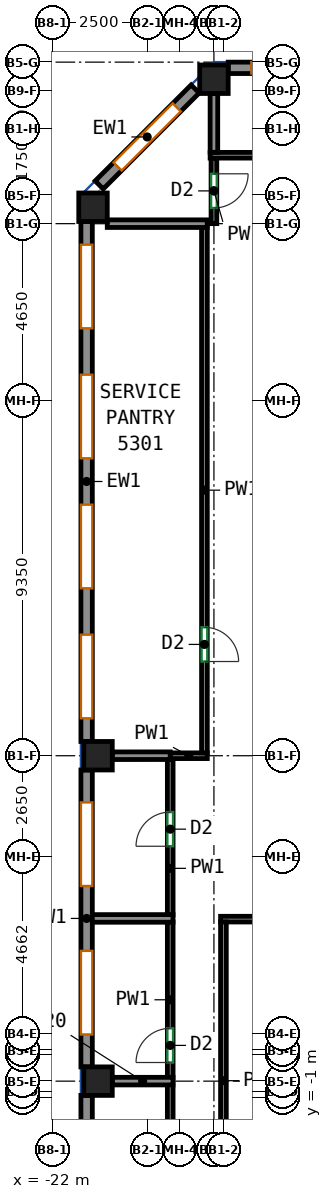
"""IFC4 building model, lengths in metres.
Left out: names, types, materials, properties, quantities, classifications, styles, units other than length and angle.
Written with IfcOpenShell. Run it as: python <this file> out.ifc"""

import sys

from ifc_helpers import new_model, si_unit, direction, frame, frame_2d, origin, origin_2d, place, context, subcontext, project, spatial, rectangle, extrude, source, transform, mapped, element, fill, save


model = new_model("IFC4")
c1 = context("Model", 3, precision=1e-05, world=origin(), true_north=direction((0.0, 1.0)))
c2 = subcontext(c1, "Body", "Model", "MODEL_VIEW")
j1 = project(units=[si_unit("LENGTHUNIT", "METRE"), si_unit("PLANEANGLEUNIT", "RADIAN")], contexts=[c1])
p1 = place(None, origin())
s1 = spatial("IfcSite", under=j1, at=p1, CompositionType="ELEMENT")
p2 = place(p1, origin())
s2 = spatial("IfcBuilding", under=s1, at=p2, CompositionType="ELEMENT")
p3 = place(p2, frame((0.0, 0.0, 216.9)))
s3 = spatial("IfcBuildingStorey", under=s2, at=p3, CompositionType="ELEMENT", Elevation=216.9)
m1 = source(origin(), c2, "Body", "SweptSolid", [
    extrude(rectangle(XDim=0.75, YDim=0.75, at=origin_2d()), origin(), (0.0, 0.0, 1.0), 3.12),
])
for number, where, z_axis, x_axis in (
    (1, (-20.932, 22.432, 0.0), (0.0, 0.0, 1.0), (1.0, 0.0, 0.0)),
    (2, (-20.8, -0.562, 0.0), (0.0, 0.0, 1.0), (1.0, 0.0, 0.0)),
    (3, (-20.8, 8.0, 0.0), (0.0, 0.0, 1.0), (1.0, 0.0, 0.0)),
    (4, (-17.75, 25.8, 0.0), (0.0, 0.0, 1.0), (1.0, 0.0, 0.0)),
):
    element("IfcColumn", number, at=place(p3, frame(where, z_axis=z_axis, x_axis=x_axis)), inside=s3, PredefinedType="COLUMN", context=c2, shape_type="MappedRepresentation", body=[
        mapped(m1, transform((0.0, 0.0, 0.0))),
    ])
m2 = source(origin(), c2, "Body", "SweptSolid", [
    extrude(rectangle(XDim=6.833, YDim=0.3, at=frame_2d((3.417, 0.0))), origin(), (0.0, 0.0, 1.0), 3.12),
])
p4 = place(p3, frame((-10.542, 26.1, 0.0), z_axis=(0.0, 0.0, 1.0), x_axis=(-1.0, 0.0, 0.0)))
e5 = element("IfcWall", 5, at=p4, inside=s3, PredefinedType="SOLIDWALL", context=c2, shape_type="MappedRepresentation", body=[
    mapped(m2, transform((0.0, 0.0, 0.0))),
])
p5 = place(p4, frame((0.608, 0.0, 0.85)))
e6 = element("IfcOpeningElement", 6, at=p5, cuts=e5, PredefinedType="OPENING", context=c2, shape_type="SweptSolid", body=[
    extrude(rectangle(XDim=2.2, YDim=1.95, at=frame_2d((1.1, 0.975))), frame((0.0, 0.16, 0.0), z_axis=(0.0, -1.0, 0.0), x_axis=(1.0, 0.0, 0.0)), (0.0, 0.0, 1.0), 0.32),
])
p6 = place(p4, frame((4.025, 0.0, 0.85)))
e7 = element("IfcOpeningElement", 7, at=p6, cuts=e5, PredefinedType="OPENING", context=c2, shape_type="SweptSolid", body=[
    extrude(rectangle(XDim=2.2, YDim=1.95, at=frame_2d((1.1, 0.975))), frame((0.0, 0.16, 0.0), z_axis=(0.0, -1.0, 0.0), x_axis=(1.0, 0.0, 0.0)), (0.0, 0.0, 1.0), 0.32),
])
m3 = source(origin(), c2, "Body", "SweptSolid", [
    extrude(rectangle(XDim=3.571, YDim=0.3, at=frame_2d((1.786, 0.0))), origin(), (0.0, 0.0, 1.0), 3.12),
])
p7 = place(p3, frame((-18.244, 25.544, 0.0), z_axis=(0.0, 0.0, 1.0), x_axis=(-0.707072595841, -0.707140964879, 0.0)))
e8 = element("IfcWall", 8, at=p7, inside=s3, PredefinedType="SOLIDWALL", context=c2, shape_type="MappedRepresentation", body=[
    mapped(m3, transform((0.0, 0.0, 0.0))),
])
p8 = place(p7, frame((0.686, 0.0, 0.85)))
e9 = element("IfcOpeningElement", 9, at=p8, cuts=e8, PredefinedType="OPENING", context=c2, shape_type="SweptSolid", body=[
    extrude(rectangle(XDim=2.2, YDim=1.95, at=frame_2d((1.1, 0.975))), frame((0.0, 0.16, 0.0), z_axis=(0.0, -1.0, 0.0), x_axis=(1.0, 0.0, 0.0)), (0.0, 0.0, 1.0), 0.32),
])
m4 = source(origin(), c2, "Body", "SweptSolid", [
    extrude(rectangle(XDim=13.682, YDim=0.3, at=frame_2d((6.841, 0.0))), origin(), (0.0, 0.0, 1.0), 3.12),
])
p9 = place(p3, frame((-21.1, 22.057, 0.0), z_axis=(0.0, 0.0, 1.0), x_axis=(0.0, -1.0, 0.0)))
e10 = element("IfcWall", 10, at=p9, inside=s3, PredefinedType="SOLIDWALL", context=c2, shape_type="MappedRepresentation", body=[
    mapped(m4, transform((0.0, 0.0, 0.0))),
])
p10 = place(p9, frame((0.61, 0.0, 0.85)))
e11 = element("IfcOpeningElement", 11, at=p10, cuts=e10, PredefinedType="OPENING", context=c2, shape_type="SweptSolid", body=[
    extrude(rectangle(XDim=2.2, YDim=1.95, at=frame_2d((1.1, 0.975))), frame((0.0, 0.16, 0.0), z_axis=(0.0, -1.0, 0.0), x_axis=(1.0, 0.0, 0.0)), (0.0, 0.0, 1.0), 0.32),
])
p11 = place(p9, frame((4.031, 0.0, 0.85)))
e12 = element("IfcOpeningElement", 12, at=p11, cuts=e10, PredefinedType="OPENING", context=c2, shape_type="SweptSolid", body=[
    extrude(rectangle(XDim=2.2, YDim=1.95, at=frame_2d((1.1, 0.975))), frame((0.0, 0.16, 0.0), z_axis=(0.0, -1.0, 0.0), x_axis=(1.0, 0.0, 0.0)), (0.0, 0.0, 1.0), 0.32),
])
p12 = place(p9, frame((7.451, 0.0, 0.85)))
e13 = element("IfcOpeningElement", 13, at=p12, cuts=e10, PredefinedType="OPENING", context=c2, shape_type="SweptSolid", body=[
    extrude(rectangle(XDim=2.2, YDim=1.95, at=frame_2d((1.1, 0.975))), frame((0.0, 0.16, 0.0), z_axis=(0.0, -1.0, 0.0), x_axis=(1.0, 0.0, 0.0)), (0.0, 0.0, 1.0), 0.32),
])
p13 = place(p9, frame((10.872, 0.0, 0.85)))
e14 = element("IfcOpeningElement", 14, at=p13, cuts=e10, PredefinedType="OPENING", context=c2, shape_type="SweptSolid", body=[
    extrude(rectangle(XDim=2.2, YDim=1.95, at=frame_2d((1.1, 0.975))), frame((0.0, 0.16, 0.0), z_axis=(0.0, -1.0, 0.0), x_axis=(1.0, 0.0, 0.0)), (0.0, 0.0, 1.0), 0.32),
])
m5 = source(origin(), c2, "Body", "SweptSolid", [
    extrude(rectangle(XDim=7.812, YDim=0.3, at=frame_2d((3.906, 0.0))), origin(), (0.0, 0.0, 1.0), 3.12),
])
p14 = place(p3, frame((-21.1, 7.625, 0.0), z_axis=(0.0, 0.0, 1.0), x_axis=(0.0, -1.0, 0.0)))
e15 = element("IfcWall", 15, at=p14, inside=s3, PredefinedType="SOLIDWALL", context=c2, shape_type="MappedRepresentation", body=[
    mapped(m5, transform((0.0, 0.0, 0.0))),
])
p15 = place(p14, frame((0.853, 0.0, 0.85)))
e16 = element("IfcOpeningElement", 16, at=p15, cuts=e15, PredefinedType="OPENING", context=c2, shape_type="SweptSolid", body=[
    extrude(rectangle(XDim=2.2, YDim=1.95, at=frame_2d((1.1, 0.975))), frame((0.0, 0.16, 0.0), z_axis=(0.0, -1.0, 0.0), x_axis=(1.0, 0.0, 0.0)), (0.0, 0.0, 1.0), 0.32),
])
p16 = place(p14, frame((4.759, 0.0, 0.85)))
e17 = element("IfcOpeningElement", 17, at=p16, cuts=e15, PredefinedType="OPENING", context=c2, shape_type="SweptSolid", body=[
    extrude(rectangle(XDim=2.2, YDim=1.95, at=frame_2d((1.1, 0.975))), frame((0.0, 0.16, 0.0), z_axis=(0.0, -1.0, 0.0), x_axis=(1.0, 0.0, 0.0)), (0.0, 0.0, 1.0), 0.32),
])
p17 = place(p3, frame((-21.1, -0.938, 0.0), z_axis=(0.0, 0.0, 1.0), x_axis=(0.0, -1.0, 0.0)))
e18 = element("IfcWall", 18, at=p17, inside=s3, PredefinedType="SOLIDWALL", context=c2, shape_type="MappedRepresentation", body=[
    mapped(m5, transform((0.0, 0.0, 0.0))),
])
p18 = place(p17, frame((0.853, 0.0, 0.85)))
e19 = element("IfcOpeningElement", 19, at=p18, cuts=e18, PredefinedType="OPENING", context=c2, shape_type="SweptSolid", body=[
    extrude(rectangle(XDim=2.2, YDim=1.95, at=frame_2d((1.1, 0.975))), frame((0.0, 0.16, 0.0), z_axis=(0.0, -1.0, 0.0), x_axis=(1.0, 0.0, 0.0)), (0.0, 0.0, 1.0), 0.32),
])
p19 = place(p17, frame((4.76, 0.0, 0.85)))
e20 = element("IfcOpeningElement", 20, at=p19, cuts=e18, PredefinedType="OPENING", context=c2, shape_type="SweptSolid", body=[
    extrude(rectangle(XDim=2.2, YDim=1.95, at=frame_2d((1.1, 0.975))), frame((0.0, 0.16, 0.0), z_axis=(0.0, -1.0, 0.0), x_axis=(1.0, 0.0, 0.0)), (0.0, 0.0, 1.0), 0.32),
])
p20 = place(p3, frame((-17.925, 8.0, 0.0), z_axis=(0.0, 0.0, 1.0), x_axis=(-1.0, 0.0, 0.0)))
e21 = element("IfcWall", 21, at=p20, inside=s3, PredefinedType="PARTITIONING", context=c2, shape_type="SweptSolid", body=[
    extrude(rectangle(XDim=0.976, YDim=0.15, at=frame_2d((0.488, 0.0))), origin(), (0.0, 0.0, 1.0), 3.12),
])
p21 = place(p3, frame((-18.0, 21.9, 0.0), z_axis=(0.0, 0.0, 1.0), x_axis=(0.0, -1.0, 0.0)))
e22 = element("IfcWall", 22, at=p21, inside=s3, PredefinedType="PARTITIONING", context=c2, shape_type="SweptSolid", body=[
    extrude(rectangle(XDim=13.825, YDim=0.15, at=frame_2d((6.913, 0.0))), origin(), (0.0, 0.0, 1.0), 3.12),
])
p22 = place(p21, frame((10.521, 0.0, 0.0)))
e23 = element("IfcOpeningElement", 23, at=p22, cuts=e22, PredefinedType="OPENING", context=c2, shape_type="SweptSolid", body=[
    extrude(rectangle(XDim=0.9, YDim=2.1, at=frame_2d((0.45, 1.05))), frame((0.0, 0.085, 0.0), z_axis=(0.0, -1.0, 0.0), x_axis=(1.0, 0.0, 0.0)), (0.0, 0.0, 1.0), 0.17),
])
p23 = place(p3, frame((-18.9, -4.753, 0.0), z_axis=(0.0, 0.0, 1.0), x_axis=(0.0, 1.0, 0.0)))
e24 = element("IfcWall", 24, at=p23, inside=s3, PredefinedType="PARTITIONING", context=c2, shape_type="SweptSolid", body=[
    extrude(rectangle(XDim=4.101, YDim=0.15, at=frame_2d((2.05, 0.0))), origin(), (0.0, 0.0, 1.0), 3.12),
])
p24 = place(p23, frame((0.5, 0.0, 0.0)))
e25 = element("IfcOpeningElement", 25, at=p24, cuts=e24, PredefinedType="OPENING", context=c2, shape_type="SweptSolid", body=[
    extrude(rectangle(XDim=0.9, YDim=2.1, at=frame_2d((0.45, 1.05))), frame((0.0, 0.085, 0.0), z_axis=(0.0, -1.0, 0.0), x_axis=(1.0, 0.0, 0.0)), (0.0, 0.0, 1.0), 0.17),
])
p25 = place(p3, frame((-18.9, -0.472, 0.0), z_axis=(0.0, 0.0, 1.0), x_axis=(0.0, 1.0, 0.0)))
e26 = element("IfcWall", 26, at=p25, inside=s3, PredefinedType="PARTITIONING", context=c2, shape_type="SweptSolid", body=[
    extrude(rectangle(XDim=4.101, YDim=0.15, at=frame_2d((2.05, 0.0))), origin(), (0.0, 0.0, 1.0), 3.12),
])
p26 = place(p25, frame((0.4, 0.0, 0.0)))
e27 = element("IfcOpeningElement", 27, at=p26, cuts=e26, PredefinedType="OPENING", context=c2, shape_type="SweptSolid", body=[
    extrude(rectangle(XDim=0.9, YDim=2.1, at=frame_2d((0.45, 1.05))), frame((0.0, 0.085, 0.0), z_axis=(0.0, -1.0, 0.0), x_axis=(1.0, 0.0, 0.0)), (0.0, 0.0, 1.0), 0.17),
])
p27 = place(p3, frame((-18.9, 3.809, 0.0), z_axis=(0.0, 0.0, 1.0), x_axis=(0.0, 1.0, 0.0)))
e28 = element("IfcWall", 28, at=p27, inside=s3, PredefinedType="PARTITIONING", context=c2, shape_type="SweptSolid", body=[
    extrude(rectangle(XDim=4.092, YDim=0.15, at=frame_2d((2.046, 0.0))), origin(), (0.0, 0.0, 1.0), 3.12),
])
p28 = place(p27, frame((1.809, 0.0, 0.0)))
e29 = element("IfcOpeningElement", 29, at=p28, cuts=e28, PredefinedType="OPENING", context=c2, shape_type="SweptSolid", body=[
    extrude(rectangle(XDim=0.9, YDim=2.1, at=frame_2d((0.45, 1.05))), frame((0.0, 0.085, 0.0), z_axis=(0.0, -1.0, 0.0), x_axis=(1.0, 0.0, 0.0)), (0.0, 0.0, 1.0), 0.17),
])
p29 = place(p3, frame((-17.75, 23.725, 0.0), z_axis=(0.0, 0.0, 1.0), x_axis=(0.0, -1.0, 0.0)))
e30 = element("IfcWall", 30, at=p29, inside=s3, PredefinedType="PARTITIONING", context=c2, shape_type="SweptSolid", body=[
    extrude(rectangle(XDim=1.725, YDim=0.15, at=frame_2d((0.863, 0.0))), origin(), (0.0, 0.0, 1.0), 3.12),
])
p30 = place(p29, frame((0.413, 0.0, 0.0)))
e31 = element("IfcOpeningElement", 31, at=p30, cuts=e30, PredefinedType="OPENING", context=c2, shape_type="SweptSolid", body=[
    extrude(rectangle(XDim=0.9, YDim=2.1, at=frame_2d((0.45, 1.05))), frame((0.0, 0.085, 0.0), z_axis=(0.0, -1.0, 0.0), x_axis=(1.0, 0.0, 0.0)), (0.0, 0.0, 1.0), 0.17),
])
p31 = place(p3, frame((27.85, 23.8, 0.0), z_axis=(0.0, 0.0, 1.0), x_axis=(-1.0, 0.0, 0.0)))
e32 = element("IfcWall", 32, at=p31, inside=s3, PredefinedType="PARTITIONING", context=c2, shape_type="SweptSolid", body=[
    extrude(rectangle(XDim=45.7, YDim=0.15, at=frame_2d((22.85, 0.0))), origin(), (0.0, 0.0, 1.0), 3.12),
])
p32 = place(p31, frame((16.838, 0.0, 0.0)))
e33 = element("IfcOpeningElement", 33, at=p32, cuts=e32, PredefinedType="OPENING", context=c2, shape_type="SweptSolid", body=[
    extrude(rectangle(XDim=1.0, YDim=2.1, at=frame_2d((0.5, 1.05))), frame((0.0, 0.085, 0.0), z_axis=(0.0, -1.0, 0.0), x_axis=(1.0, 0.0, 0.0)), (0.0, 0.0, 1.0), 0.17),
])
p33 = place(p3, frame((-17.575, 3.7, 0.0), z_axis=(0.0, 0.0, 1.0), x_axis=(1.0, 0.0, 0.0)))
e34 = element("IfcWall", 34, at=p33, inside=s3, PredefinedType="PARTITIONING", context=c2, shape_type="SweptSolid", body=[
    extrude(rectangle(XDim=33.85, YDim=0.15, at=frame_2d((16.925, 0.0))), origin(), (0.0, 0.0, 1.0), 3.12),
])
p34 = place(p33, frame((1.902, 0.0, 0.0)))
e35 = element("IfcOpeningElement", 35, at=p34, cuts=e34, PredefinedType="OPENING", context=c2, shape_type="SweptSolid", body=[
    extrude(rectangle(XDim=0.9, YDim=2.1, at=frame_2d((0.45, 1.05))), frame((0.0, 0.085, 0.0), z_axis=(0.0, -1.0, 0.0), x_axis=(1.0, 0.0, 0.0)), (0.0, 0.0, 1.0), 0.17),
])
p35 = place(p33, frame((15.841, 0.0, 0.0)))
e36 = element("IfcOpeningElement", 36, at=p35, cuts=e34, PredefinedType="OPENING", context=c2, shape_type="SweptSolid", body=[
    extrude(rectangle(XDim=0.9, YDim=2.1, at=frame_2d((0.45, 1.05))), frame((0.0, 0.085, 0.0), z_axis=(0.0, -1.0, 0.0), x_axis=(1.0, 0.0, 0.0)), (0.0, 0.0, 1.0), 0.17),
])
p36 = place(p33, frame((20.724, 0.0, 0.0)))
e37 = element("IfcOpeningElement", 37, at=p36, cuts=e34, PredefinedType="OPENING", context=c2, shape_type="SweptSolid", body=[
    extrude(rectangle(XDim=0.9, YDim=2.1, at=frame_2d((0.45, 1.05))), frame((0.0, 0.085, 0.0), z_axis=(0.0, -1.0, 0.0), x_axis=(1.0, 0.0, 0.0)), (0.0, 0.0, 1.0), 0.17),
])
p37 = place(p33, frame((27.46, 0.0, 0.0)))
e38 = element("IfcOpeningElement", 38, at=p37, cuts=e34, PredefinedType="OPENING", context=c2, shape_type="SweptSolid", body=[
    extrude(rectangle(XDim=0.9, YDim=2.1, at=frame_2d((0.45, 1.05))), frame((0.0, 0.085, 0.0), z_axis=(0.0, -1.0, 0.0), x_axis=(1.0, 0.0, 0.0)), (0.0, 0.0, 1.0), 0.17),
])
p38 = place(p3, frame((-17.5, -4.725, 0.0), z_axis=(0.0, 0.0, 1.0), x_axis=(0.0, 1.0, 0.0)))
e39 = element("IfcWall", 39, at=p38, inside=s3, PredefinedType="PARTITIONING", context=c2, shape_type="SweptSolid", body=[
    extrude(rectangle(XDim=8.35, YDim=0.15, at=frame_2d((4.175, 0.0))), origin(), (0.0, 0.0, 1.0), 3.12),
])
p39 = place(p3, frame((-20.425, 8.0, 0.0), z_axis=(0.0, 0.0, 1.0), x_axis=(0.999999794741, 0.000640717472, 0.0)))
e40 = element("IfcWall", 40, at=p39, inside=s3, PredefinedType="PARTITIONING", context=c2, shape_type="SweptSolid", body=[
    extrude(rectangle(XDim=1.524, YDim=0.2, at=frame_2d((0.762, 0.0))), origin(), (0.0, 0.0, 1.0), 3.12),
])
p40 = place(p3, frame((-17.927, 22.0, 0.0), z_axis=(0.0, 0.0, 1.0), x_axis=(-1.0, 0.0, 0.0)))
e41 = element("IfcWall", 41, at=p40, inside=s3, PredefinedType="PARTITIONING", context=c2, shape_type="SweptSolid", body=[
    extrude(rectangle(XDim=2.63, YDim=0.2, at=frame_2d((1.315, 0.0))), origin(), (0.0, 0.0, 1.0), 3.12),
])
p41 = place(p3, frame((-18.827, -0.562, 0.0), z_axis=(0.0, 0.0, 1.0), x_axis=(-1.0, 0.0, 0.0)))
e42 = element("IfcWall", 42, at=p41, inside=s3, PredefinedType="PARTITIONING", context=c2, shape_type="SweptSolid", body=[
    extrude(rectangle(XDim=1.598, YDim=0.2, at=frame_2d((0.799, 0.0))), origin(), (0.0, 0.0, 1.0), 2.52),
])
p42 = place(p3, frame((-21.0, 3.719, 0.0), z_axis=(0.0, 0.0, 1.0), x_axis=(1.0, 0.0, 0.0)))
e43 = element("IfcWall", 43, at=p42, inside=s3, PredefinedType="PARTITIONING", context=c2, shape_type="SweptSolid", body=[
    extrude(rectangle(XDim=2.173, YDim=0.2, at=frame_2d((1.086, 0.0))), origin(), (0.0, 0.0, 1.0), 3.12),
])
p43 = place(p3, frame((-17.75, 23.877, 0.0), z_axis=(0.0, 0.0, 1.0), x_axis=(0.0, 1.0, 0.0)))
e44 = element("IfcWall", 44, at=p43, inside=s3, PredefinedType="PARTITIONING", context=c2, shape_type="SweptSolid", body=[
    extrude(rectangle(XDim=1.548, YDim=0.2, at=frame_2d((0.774, 0.0))), origin(), (0.0, 0.0, 1.0), 3.12),
])
p44 = place(p6, origin())
e45 = element("IfcWindow", 45, at=p44, inside=s3, PartitioningType="SINGLE_PANEL", PredefinedType="WINDOW", context=c2, shape_type="SweptSolid", body=[
    extrude(rectangle(XDim=2.2, YDim=1.95, at=frame_2d((1.1, 0.975))), frame((0.0, 0.03, 0.0), z_axis=(0.0, -1.0, 0.0), x_axis=(1.0, 0.0, 0.0)), (0.0, 0.0, 1.0), 0.06),
])
fill(e7, e45)
p45 = place(p8, origin())
e46 = element("IfcWindow", 46, at=p45, inside=s3, PartitioningType="SINGLE_PANEL", PredefinedType="WINDOW", context=c2, shape_type="SweptSolid", body=[
    extrude(rectangle(XDim=2.2, YDim=1.95, at=frame_2d((1.1, 0.975))), frame((0.0, 0.03, 0.0), z_axis=(0.0, -1.0, 0.0), x_axis=(1.0, 0.0, 0.0)), (0.0, 0.0, 1.0), 0.06),
])
fill(e9, e46)
p46 = place(p10, origin())
e47 = element("IfcWindow", 47, at=p46, inside=s3, PartitioningType="SINGLE_PANEL", PredefinedType="WINDOW", context=c2, shape_type="SweptSolid", body=[
    extrude(rectangle(XDim=2.2, YDim=1.95, at=frame_2d((1.1, 0.975))), frame((0.0, 0.03, 0.0), z_axis=(0.0, -1.0, 0.0), x_axis=(1.0, 0.0, 0.0)), (0.0, 0.0, 1.0), 0.06),
])
fill(e11, e47)
p47 = place(p11, origin())
e48 = element("IfcWindow", 48, at=p47, inside=s3, PartitioningType="SINGLE_PANEL", PredefinedType="WINDOW", context=c2, shape_type="SweptSolid", body=[
    extrude(rectangle(XDim=2.2, YDim=1.95, at=frame_2d((1.1, 0.975))), frame((0.0, 0.03, 0.0), z_axis=(0.0, -1.0, 0.0), x_axis=(1.0, 0.0, 0.0)), (0.0, 0.0, 1.0), 0.06),
])
fill(e12, e48)
p48 = place(p12, origin())
e49 = element("IfcWindow", 49, at=p48, inside=s3, PartitioningType="SINGLE_PANEL", PredefinedType="WINDOW", context=c2, shape_type="SweptSolid", body=[
    extrude(rectangle(XDim=2.2, YDim=1.95, at=frame_2d((1.1, 0.975))), frame((0.0, 0.03, 0.0), z_axis=(0.0, -1.0, 0.0), x_axis=(1.0, 0.0, 0.0)), (0.0, 0.0, 1.0), 0.06),
])
fill(e13, e49)
p49 = place(p13, origin())
e50 = element("IfcWindow", 50, at=p49, inside=s3, PartitioningType="SINGLE_PANEL", PredefinedType="WINDOW", context=c2, shape_type="SweptSolid", body=[
    extrude(rectangle(XDim=2.2, YDim=1.95, at=frame_2d((1.1, 0.975))), frame((0.0, 0.03, 0.0), z_axis=(0.0, -1.0, 0.0), x_axis=(1.0, 0.0, 0.0)), (0.0, 0.0, 1.0), 0.06),
])
fill(e14, e50)
p50 = place(p15, origin())
e51 = element("IfcWindow", 51, at=p50, inside=s3, PartitioningType="SINGLE_PANEL", PredefinedType="WINDOW", context=c2, shape_type="SweptSolid", body=[
    extrude(rectangle(XDim=2.2, YDim=1.95, at=frame_2d((1.1, 0.975))), frame((0.0, 0.03, 0.0), z_axis=(0.0, -1.0, 0.0), x_axis=(1.0, 0.0, 0.0)), (0.0, 0.0, 1.0), 0.06),
])
fill(e16, e51)
p51 = place(p16, origin())
e52 = element("IfcWindow", 52, at=p51, inside=s3, PartitioningType="SINGLE_PANEL", PredefinedType="WINDOW", context=c2, shape_type="SweptSolid", body=[
    extrude(rectangle(XDim=2.2, YDim=1.95, at=frame_2d((1.1, 0.975))), frame((0.0, 0.03, 0.0), z_axis=(0.0, -1.0, 0.0), x_axis=(1.0, 0.0, 0.0)), (0.0, 0.0, 1.0), 0.06),
])
fill(e17, e52)
p52 = place(p26, origin())
e53 = element("IfcDoor", 53, at=p52, inside=s3, OperationType="SINGLE_SWING_LEFT", PredefinedType="DOOR", context=c2, shape_type="SweptSolid", body=[
    extrude(rectangle(XDim=0.9, YDim=2.1, at=frame_2d((0.45, 1.05))), frame((0.0, 0.025, 0.0), z_axis=(0.0, -1.0, 0.0), x_axis=(1.0, 0.0, 0.0)), (0.0, 0.0, 1.0), 0.05),
])
fill(e27, e53)
p53 = place(p28, origin())
e54 = element("IfcDoor", 54, at=p53, inside=s3, OperationType="SINGLE_SWING_LEFT", PredefinedType="DOOR", context=c2, shape_type="SweptSolid", body=[
    extrude(rectangle(XDim=0.9, YDim=2.1, at=frame_2d((0.45, 1.05))), frame((0.0, 0.025, 0.0), z_axis=(0.0, -1.0, 0.0), x_axis=(1.0, 0.0, 0.0)), (0.0, 0.0, 1.0), 0.05),
])
fill(e29, e54)
p54 = place(p22, origin())
e55 = element("IfcDoor", 55, at=p54, inside=s3, OperationType="SINGLE_SWING_RIGHT", PredefinedType="DOOR", context=c2, shape_type="SweptSolid", body=[
    extrude(rectangle(XDim=0.9, YDim=2.1, at=frame_2d((0.45, 1.05))), frame((0.0, 0.025, 0.0), z_axis=(0.0, -1.0, 0.0), x_axis=(1.0, 0.0, 0.0)), (0.0, 0.0, 1.0), 0.05),
])
fill(e23, e55)
p55 = place(p30, origin())
e56 = element("IfcDoor", 56, at=p55, inside=s3, OperationType="SINGLE_SWING_LEFT", PredefinedType="DOOR", context=c2, shape_type="SweptSolid", body=[
    extrude(rectangle(XDim=0.9, YDim=2.1, at=frame_2d((0.45, 1.05))), frame((0.0, 0.025, 0.0), z_axis=(0.0, -1.0, 0.0), x_axis=(1.0, 0.0, 0.0)), (0.0, 0.0, 1.0), 0.05),
])
fill(e31, e56)
save(model, sys.argv[1])
